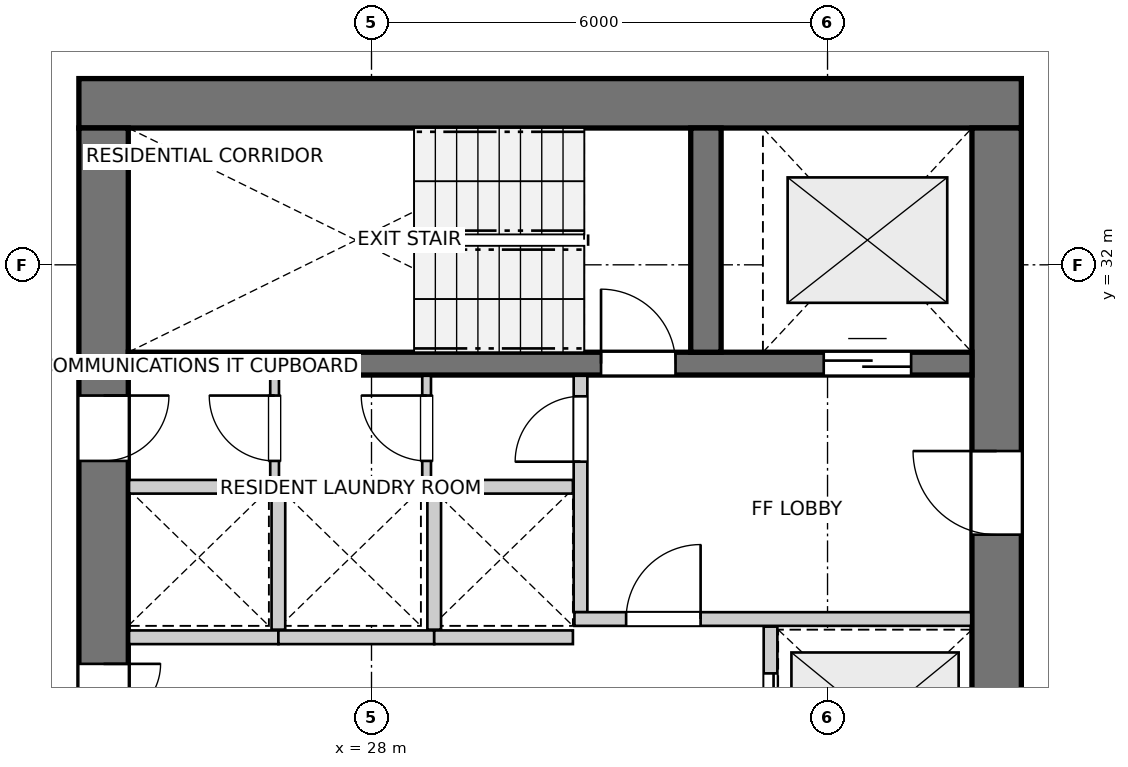
"""IFC4 building model, lengths in metres.
Left out: names, types, materials, properties, quantities, classifications, styles, units other than length and angle.
Written with IfcOpenShell. Run it as: python <this file> out.ifc"""

import sys

from ifc_helpers import new_model, si_unit, direction, frame, frame_2d, origin, place, context, subcontext, project, spatial, rectangle, extrude, source, transform, mapped, element, fill, save


model = new_model("IFC4")
c1 = context("Model", 3, precision=1e-05, world=origin(), true_north=direction((0.0, 1.0)))
c2 = subcontext(c1, "Body", "Model", "MODEL_VIEW")
j1 = project(units=[si_unit("LENGTHUNIT", "METRE"), si_unit("PLANEANGLEUNIT", "RADIAN")], contexts=[c1])
p1 = place(None, origin())
s1 = spatial("IfcSite", under=j1, at=p1, CompositionType="ELEMENT")
p2 = place(p1, origin())
s2 = spatial("IfcBuilding", under=s1, at=p2, CompositionType="ELEMENT")
p3 = place(p2, frame((0.0, 0.0, 121.6)))
s3 = spatial("IfcBuildingStorey", under=s2, at=p3, CompositionType="ELEMENT", Elevation=121.6)
p4 = place(p3, frame((36.55, 34.125, 0.0), z_axis=(0.0, 0.0, 1.0), x_axis=(-1.0, 0.0, 0.0)))
e1 = element("IfcWall", 1, at=p4, inside=s3, PredefinedType="SHEAR", context=c2, shape_type="SweptSolid", body=[
    extrude(rectangle(XDim=12.4, YDim=0.65, at=frame_2d((6.2, 0.0))), origin(), (0.0, 0.0, 1.0), 2.95),
])
p5 = place(p3, frame((24.475, 33.8, 0.0), z_axis=(0.0, 0.0, 1.0), x_axis=(0.0, -1.0, 0.0)))
e2 = element("IfcWall", 2, at=p5, inside=s3, PredefinedType="SHEAR", context=c2, shape_type="SweptSolid", body=[
    extrude(rectangle(XDim=15.6, YDim=0.65, at=frame_2d((7.8, 0.0))), origin(), (0.0, 0.0, 1.0), 2.95),
])
p6 = place(p5, frame((7.05, 0.0, 0.0)))
e3 = element("IfcOpeningElement", 3, at=p6, cuts=e2, PredefinedType="OPENING", context=c2, shape_type="SweptSolid", body=[
    extrude(rectangle(XDim=1.5, YDim=2.15, at=frame_2d((0.75, 1.075))), frame((0.0, 0.335, 0.0), z_axis=(0.0, -1.0, 0.0), x_axis=(1.0, 0.0, 0.0)), (0.0, 0.0, 1.0), 0.67),
])
p7 = place(p5, frame((3.52, 0.0, 0.0)))
e4 = element("IfcOpeningElement", 4, at=p7, cuts=e2, PredefinedType="OPENING", context=c2, shape_type="SweptSolid", body=[
    extrude(rectangle(XDim=0.86, YDim=2.05, at=frame_2d((0.43, 1.025))), frame((0.0, 0.335, 0.0), z_axis=(0.0, -1.0, 0.0), x_axis=(1.0, 0.0, 0.0)), (0.0, 0.0, 1.0), 0.67),
])
p8 = place(p5, frame((11.22, 0.0, 0.0)))
e5 = element("IfcOpeningElement", 5, at=p8, cuts=e2, PredefinedType="OPENING", context=c2, shape_type="SweptSolid", body=[
    extrude(rectangle(XDim=0.86, YDim=2.05, at=frame_2d((0.43, 1.025))), frame((0.0, 0.335, 0.0), z_axis=(0.0, -1.0, 0.0), x_axis=(1.0, 0.0, 0.0)), (0.0, 0.0, 1.0), 0.67),
])
p9 = place(p3, frame((36.225, 18.2, 0.0), z_axis=(0.0, 0.0, 1.0), x_axis=(0.0, 1.0, 0.0)))
e6 = element("IfcWall", 6, at=p9, inside=s3, PredefinedType="SHEAR", context=c2, shape_type="SweptSolid", body=[
    extrude(rectangle(XDim=15.6, YDim=0.65, at=frame_2d((7.8, 0.0))), origin(), (0.0, 0.0, 1.0), 2.95),
])
p10 = place(p9, frame((4.25, 0.0, 0.0)))
e7 = element("IfcOpeningElement", 7, at=p10, cuts=e6, PredefinedType="OPENING", context=c2, shape_type="SweptSolid", body=[
    extrude(rectangle(XDim=1.1, YDim=2.15, at=frame_2d((0.55, 1.075))), frame((0.0, 0.335, 0.0), z_axis=(0.0, -1.0, 0.0), x_axis=(1.0, 0.0, 0.0)), (0.0, 0.0, 1.0), 0.67),
])
p11 = place(p9, frame((10.25, 0.0, 0.0)))
e8 = element("IfcOpeningElement", 8, at=p11, cuts=e6, PredefinedType="OPENING", context=c2, shape_type="SweptSolid", body=[
    extrude(rectangle(XDim=1.1, YDim=2.15, at=frame_2d((0.55, 1.075))), frame((0.0, 0.335, 0.0), z_axis=(0.0, -1.0, 0.0), x_axis=(1.0, 0.0, 0.0)), (0.0, 0.0, 1.0), 0.67),
])
p12 = place(p3, frame((24.8, 30.7, 0.0), z_axis=(0.0, 0.0, 1.0), x_axis=(1.0, 0.0, 0.0)))
e9 = element("IfcWall", 9, at=p12, inside=s3, PredefinedType="SHEAR", context=c2, shape_type="SweptSolid", body=[
    extrude(rectangle(XDim=11.1, YDim=0.3, at=frame_2d((5.55, 0.0))), origin(), (0.0, 0.0, 1.0), 2.95),
])
p13 = place(p12, frame((6.22, 0.0, 0.0)))
e10 = element("IfcOpeningElement", 10, at=p13, cuts=e9, PredefinedType="OPENING", context=c2, shape_type="SweptSolid", body=[
    extrude(rectangle(XDim=0.98, YDim=2.15, at=frame_2d((0.49, 1.075))), frame((0.0, 0.16, 0.0), z_axis=(0.0, -1.0, 0.0), x_axis=(1.0, 0.0, 0.0)), (0.0, 0.0, 1.0), 0.32),
])
p14 = place(p12, frame((9.15, 0.0, 0.0)))
e11 = element("IfcOpeningElement", 11, at=p14, cuts=e9, PredefinedType="OPENING", context=c2, shape_type="SweptSolid", body=[
    extrude(rectangle(XDim=1.15, YDim=2.15, at=frame_2d((0.575, 1.075))), frame((0.0, 0.16, 0.0), z_axis=(0.0, -1.0, 0.0), x_axis=(1.0, 0.0, 0.0)), (0.0, 0.0, 1.0), 0.32),
])
p15 = place(p3, frame((32.4, 30.85, 0.0), z_axis=(0.0, 0.0, 1.0), x_axis=(0.0, 1.0, 0.0)))
e12 = element("IfcWall", 12, at=p15, inside=s3, PredefinedType="SHEAR", context=c2, shape_type="SweptSolid", body=[
    extrude(rectangle(XDim=2.95, YDim=0.4, at=frame_2d((1.475, 0.0))), origin(), (0.0, 0.0, 1.0), 2.95),
])
p16 = place(p3, frame((30.75, 27.43, 0.0), z_axis=(0.0, 0.0, 1.0), x_axis=(0.0, 1.0, 0.0)))
e13 = element("IfcWall", 13, at=p16, inside=s3, PredefinedType="PARTITIONING", context=c2, shape_type="SweptSolid", body=[
    extrude(rectangle(XDim=3.11, YDim=0.18, at=frame_2d((1.555, 0.0))), origin(), (0.0, 0.0, 1.0), 2.95),
])
p17 = place(p16, frame((1.98, 0.0, 0.0)))
e14 = element("IfcOpeningElement", 14, at=p17, cuts=e13, PredefinedType="OPENING", context=c2, shape_type="SweptSolid", body=[
    extrude(rectangle(XDim=0.86, YDim=2.05, at=frame_2d((0.43, 1.025))), frame((0.0, 0.1, 0.0), z_axis=(0.0, -1.0, 0.0), x_axis=(1.0, 0.0, 0.0)), (0.0, 0.0, 1.0), 0.2),
])
p18 = place(p3, frame((30.67, 27.34, 0.0), z_axis=(0.0, 0.0, 1.0), x_axis=(1.0, 0.0, 0.0)))
e15 = element("IfcWall", 15, at=p18, inside=s3, PredefinedType="PARTITIONING", context=c2, shape_type="SweptSolid", body=[
    extrude(rectangle(XDim=5.22, YDim=0.18, at=frame_2d((2.61, 0.0))), origin(), (0.0, 0.0, 1.0), 2.95),
])
p19 = place(p18, frame((0.68, 0.0, 0.0)))
e16 = element("IfcOpeningElement", 16, at=p19, cuts=e15, PredefinedType="OPENING", context=c2, shape_type="SweptSolid", body=[
    extrude(rectangle(XDim=0.98, YDim=2.15, at=frame_2d((0.49, 1.075))), frame((0.0, 0.1, 0.0), z_axis=(0.0, -1.0, 0.0), x_axis=(1.0, 0.0, 0.0)), (0.0, 0.0, 1.0), 0.2),
])
p20 = place(p3, frame((33.25, 24.76, 0.0), z_axis=(0.0, 0.0, 1.0), x_axis=(0.0, 1.0, 0.0)))
e17 = element("IfcWall", 17, at=p20, inside=s3, PredefinedType="PARTITIONING", context=c2, shape_type="SweptSolid", body=[
    extrude(rectangle(XDim=2.48, YDim=0.18, at=frame_2d((1.24, 0.0))), origin(), (0.0, 0.0, 1.0), 2.95),
])
p21 = place(p20, frame((0.615, 0.0, 0.0)))
e18 = element("IfcOpeningElement", 18, at=p21, cuts=e17, PredefinedType="OPENING", context=c2, shape_type="SweptSolid", body=[
    extrude(rectangle(XDim=1.25, YDim=2.15, at=frame_2d((0.625, 1.075))), frame((0.0, 0.1, 0.0), z_axis=(0.0, -1.0, 0.0), x_axis=(1.0, 0.0, 0.0)), (0.0, 0.0, 1.0), 0.2),
])
p22 = place(p3, frame((24.81, 29.08, 0.0), z_axis=(0.0, 0.0, 1.0), x_axis=(1.0, 0.0, 0.0)))
e19 = element("IfcWall", 19, at=p22, inside=s3, PredefinedType="PARTITIONING", context=c2, shape_type="SweptSolid", body=[
    extrude(rectangle(XDim=5.84, YDim=0.18, at=frame_2d((2.92, 0.0))), origin(), (0.0, 0.0, 1.0), 2.95),
])
p23 = place(p3, frame((24.81, 27.1, 0.0), z_axis=(0.0, 0.0, 1.0), x_axis=(1.0, 0.0, 0.0)))
e20 = element("IfcWall", 20, at=p23, inside=s3, PredefinedType="PARTITIONING", context=c2, shape_type="SweptSolid", body=[
    extrude(rectangle(XDim=1.965, YDim=0.18, at=frame_2d((0.982, 0.0))), origin(), (0.0, 0.0, 1.0), 2.95),
])
p24 = place(p3, frame((26.775, 27.1, 0.0), z_axis=(0.0, 0.0, 1.0), x_axis=(1.0, 0.0, 0.0)))
e21 = element("IfcWall", 21, at=p24, inside=s3, PredefinedType="PARTITIONING", context=c2, shape_type="SweptSolid", body=[
    extrude(rectangle(XDim=2.05, YDim=0.18, at=frame_2d((1.025, 0.0))), origin(), (0.0, 0.0, 1.0), 2.95),
])
p25 = place(p3, frame((26.775, 27.2, 0.0), z_axis=(0.0, 0.0, 1.0), x_axis=(0.0, 1.0, 0.0)))
e22 = element("IfcWall", 22, at=p25, inside=s3, PredefinedType="PARTITIONING", context=c2, shape_type="SweptSolid", body=[
    extrude(rectangle(XDim=1.78, YDim=0.18, at=frame_2d((0.89, 0.0))), origin(), (0.0, 0.0, 1.0), 2.95),
])
p26 = place(p3, frame((28.825, 27.1, 0.0), z_axis=(0.0, 0.0, 1.0), x_axis=(1.0, 0.0, 0.0)))
e23 = element("IfcWall", 23, at=p26, inside=s3, PredefinedType="PARTITIONING", context=c2, shape_type="SweptSolid", body=[
    extrude(rectangle(XDim=1.825, YDim=0.18, at=frame_2d((0.913, 0.0))), origin(), (0.0, 0.0, 1.0), 2.95),
])
p27 = place(p3, frame((28.825, 27.2, 0.0), z_axis=(0.0, 0.0, 1.0), x_axis=(0.0, 1.0, 0.0)))
e24 = element("IfcWall", 24, at=p27, inside=s3, PredefinedType="PARTITIONING", context=c2, shape_type="SweptSolid", body=[
    extrude(rectangle(XDim=1.78, YDim=0.18, at=frame_2d((0.89, 0.0))), origin(), (0.0, 0.0, 1.0), 2.95),
])
p28 = place(p3, frame((26.725, 29.16, 0.0), z_axis=(0.0, 0.0, 1.0), x_axis=(0.0, 1.0, 0.0)))
e25 = element("IfcWall", 25, at=p28, inside=s3, PredefinedType="PARTITIONING", context=c2, shape_type="SweptSolid", body=[
    extrude(rectangle(XDim=1.38, YDim=0.115, at=frame_2d((0.69, 0.0))), origin(), (0.0, 0.0, 1.0), 2.95),
])
p29 = place(p28, frame((0.26, 0.0, 0.0)))
e26 = element("IfcOpeningElement", 26, at=p29, cuts=e25, PredefinedType="OPENING", context=c2, shape_type="SweptSolid", body=[
    extrude(rectangle(XDim=0.86, YDim=2.05, at=frame_2d((0.43, 1.025))), frame((0.0, 0.067, 0.0), z_axis=(0.0, -1.0, 0.0), x_axis=(1.0, 0.0, 0.0)), (0.0, 0.0, 1.0), 0.135),
])
p30 = place(p3, frame((28.725, 29.16, 0.0), z_axis=(0.0, 0.0, 1.0), x_axis=(0.0, 1.0, 0.0)))
e27 = element("IfcWall", 27, at=p30, inside=s3, PredefinedType="PARTITIONING", context=c2, shape_type="SweptSolid", body=[
    extrude(rectangle(XDim=1.38, YDim=0.115, at=frame_2d((0.69, 0.0))), origin(), (0.0, 0.0, 1.0), 2.95),
])
p31 = place(p30, frame((0.26, 0.0, 0.0)))
e28 = element("IfcOpeningElement", 28, at=p31, cuts=e27, PredefinedType="OPENING", context=c2, shape_type="SweptSolid", body=[
    extrude(rectangle(XDim=0.86, YDim=2.05, at=frame_2d((0.43, 1.025))), frame((0.0, 0.067, 0.0), z_axis=(0.0, -1.0, 0.0), x_axis=(1.0, 0.0, 0.0)), (0.0, 0.0, 1.0), 0.135),
])
m1 = source(origin(), c2, "Body", "SweptSolid", [
    extrude(rectangle(XDim=0.98, YDim=2.15, at=frame_2d((0.49, 1.075))), frame((0.0, 0.025, 0.0), z_axis=(0.0, -1.0, 0.0), x_axis=(1.0, 0.0, 0.0)), (0.0, 0.0, 1.0), 0.05),
])
p32 = place(p13, origin())
e29 = element("IfcDoor", 29, at=p32, inside=s3, OperationType="SINGLE_SWING_LEFT", PredefinedType="DOOR", context=c2, shape_type="MappedRepresentation", body=[
    mapped(m1, transform((0.0, 0.0, 0.0), x_axis=(1.0, 0.0, 0.0), y_axis=(0.0, 1.0, 0.0), z_axis=(0.0, 0.0, 1.0), scale=1.0)),
])
fill(e10, e29)
m2 = source(origin(), c2, "Body", "SweptSolid", [
    extrude(rectangle(XDim=1.15, YDim=2.15, at=frame_2d((0.575, 1.075))), frame((0.0, 0.025, 0.0), z_axis=(0.0, -1.0, 0.0), x_axis=(1.0, 0.0, 0.0)), (0.0, 0.0, 1.0), 0.05),
])
p33 = place(p14, origin())
e30 = element("IfcDoor", 30, at=p33, inside=s3, OperationType="DOUBLE_DOOR_SLIDING", PredefinedType="DOOR", context=c2, shape_type="MappedRepresentation", body=[
    mapped(m2, transform((0.0, 0.0, 0.0), x_axis=(1.0, 0.0, 0.0), y_axis=(0.0, 1.0, 0.0), z_axis=(0.0, 0.0, 1.0), scale=1.0)),
])
fill(e11, e30)
m3 = source(origin(), c2, "Body", "SweptSolid", [
    extrude(rectangle(XDim=1.1, YDim=2.15, at=frame_2d((0.55, 1.075))), frame((0.0, 0.025, 0.0), z_axis=(0.0, -1.0, 0.0), x_axis=(1.0, 0.0, 0.0)), (0.0, 0.0, 1.0), 0.05),
])
p34 = place(p11, origin())
e31 = element("IfcDoor", 31, at=p34, inside=s3, OperationType="SINGLE_SWING_RIGHT", PredefinedType="DOOR", context=c2, shape_type="MappedRepresentation", body=[
    mapped(m3, transform((0.0, 0.0, 0.0), x_axis=(1.0, 0.0, 0.0), y_axis=(0.0, 1.0, 0.0), z_axis=(0.0, 0.0, 1.0), scale=1.0)),
])
fill(e8, e31)
m4 = source(origin(), c2, "Body", "SweptSolid", [
    extrude(rectangle(XDim=1.5, YDim=2.15, at=frame_2d((0.75, 1.075))), frame((0.0, 0.025, 0.0), z_axis=(0.0, -1.0, 0.0), x_axis=(1.0, 0.0, 0.0)), (0.0, 0.0, 1.0), 0.05),
])
p35 = place(p6, origin())
e32 = element("IfcDoor", 32, at=p35, inside=s3, OperationType="DOUBLE_DOOR_SINGLE_SWING", PredefinedType="DOOR", context=c2, shape_type="MappedRepresentation", body=[
    mapped(m4, transform((0.0, 0.0, 0.0), x_axis=(1.0, 0.0, 0.0), y_axis=(0.0, 1.0, 0.0), z_axis=(0.0, 0.0, 1.0), scale=1.0)),
])
fill(e3, e32)
m5 = source(origin(), c2, "Body", "SweptSolid", [
    extrude(rectangle(XDim=0.86, YDim=2.05, at=frame_2d((0.43, 1.025))), frame((0.0, 0.025, 0.0), z_axis=(0.0, -1.0, 0.0), x_axis=(1.0, 0.0, 0.0)), (0.0, 0.0, 1.0), 0.05),
])
p36 = place(p7, origin())
e33 = element("IfcDoor", 33, at=p36, inside=s3, OperationType="SINGLE_SWING_LEFT", PredefinedType="DOOR", context=c2, shape_type="MappedRepresentation", body=[
    mapped(m5, transform((0.0, 0.0, 0.0), x_axis=(1.0, 0.0, 0.0), y_axis=(0.0, 1.0, 0.0), z_axis=(0.0, 0.0, 1.0), scale=1.0)),
])
fill(e4, e33)
p37 = place(p17, origin())
e34 = element("IfcDoor", 34, at=p37, inside=s3, OperationType="SINGLE_SWING_LEFT", PredefinedType="DOOR", context=c2, shape_type="MappedRepresentation", body=[
    mapped(m5, transform((0.0, 0.0, 0.0), x_axis=(1.0, 0.0, 0.0), y_axis=(0.0, 1.0, 0.0), z_axis=(0.0, 0.0, 1.0), scale=1.0)),
])
fill(e14, e34)
p38 = place(p19, origin())
e35 = element("IfcDoor", 35, at=p38, inside=s3, OperationType="SINGLE_SWING_RIGHT", PredefinedType="DOOR", context=c2, shape_type="MappedRepresentation", body=[
    mapped(m1, transform((0.0, 0.0, 0.0), x_axis=(1.0, 0.0, 0.0), y_axis=(0.0, 1.0, 0.0), z_axis=(0.0, 0.0, 1.0), scale=1.0)),
])
fill(e16, e35)
m6 = source(origin(), c2, "Body", "SweptSolid", [
    extrude(rectangle(XDim=1.25, YDim=2.15, at=frame_2d((0.625, 1.075))), frame((0.0, 0.025, 0.0), z_axis=(0.0, -1.0, 0.0), x_axis=(1.0, 0.0, 0.0)), (0.0, 0.0, 1.0), 0.05),
])
p39 = place(p21, origin())
e36 = element("IfcDoor", 36, at=p39, inside=s3, OperationType="DOUBLE_DOOR_SLIDING", PredefinedType="DOOR", context=c2, shape_type="MappedRepresentation", body=[
    mapped(m6, transform((0.0, 0.0, 0.0), x_axis=(1.0, 0.0, 0.0), y_axis=(0.0, 1.0, 0.0), z_axis=(0.0, 0.0, 1.0), scale=1.0)),
])
fill(e18, e36)
p40 = place(p29, origin())
e37 = element("IfcDoor", 37, at=p40, inside=s3, OperationType="SINGLE_SWING_RIGHT", PredefinedType="DOOR", context=c2, shape_type="MappedRepresentation", body=[
    mapped(m5, transform((0.0, 0.0, 0.0), x_axis=(1.0, 0.0, 0.0), y_axis=(0.0, 1.0, 0.0), z_axis=(0.0, 0.0, 1.0), scale=1.0)),
])
fill(e26, e37)
p41 = place(p31, origin())
e38 = element("IfcDoor", 38, at=p41, inside=s3, OperationType="SINGLE_SWING_RIGHT", PredefinedType="DOOR", context=c2, shape_type="MappedRepresentation", body=[
    mapped(m5, transform((0.0, 0.0, 0.0), x_axis=(1.0, 0.0, 0.0), y_axis=(0.0, 1.0, 0.0), z_axis=(0.0, 0.0, 1.0), scale=1.0)),
])
fill(e28, e38)
save(model, sys.argv[1])
